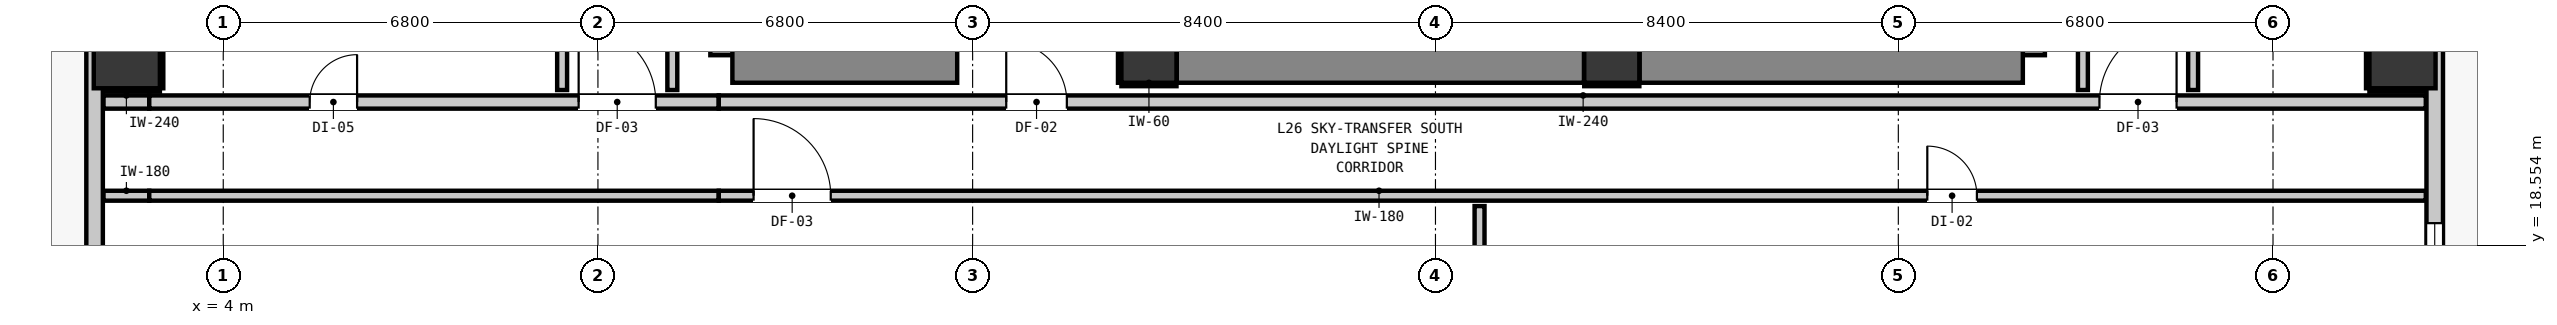
"""IFC4 building model, lengths in metres.
Left out: names, types, materials, properties, quantities, classifications, styles, units other than length and angle.
Written with IfcOpenShell. Run it as: python <this file> out.ifc"""

import sys

from ifc_helpers import new_model, si_unit, direction, frame, frame_2d, origin, origin_2d, place, context, subcontext, project, spatial, rectangle, extrude, element, fill, save


model = new_model("IFC4")
c1 = context("Model", 3, precision=1e-05, world=origin(), true_north=direction((0.0, 1.0)))
c2 = subcontext(c1, "Body", "Model", "MODEL_VIEW")
j1 = project(units=[si_unit("LENGTHUNIT", "METRE"), si_unit("PLANEANGLEUNIT", "RADIAN")], contexts=[c1])
p1 = place(None, origin())
s1 = spatial("IfcSite", under=j1, at=p1, CompositionType="ELEMENT")
p2 = place(p1, origin())
s2 = spatial("IfcBuilding", under=s1, at=p2, CompositionType="ELEMENT")
p3 = place(p2, frame((0.0, 0.0, 92.8)))
s3 = spatial("IfcBuildingStorey", under=s2, at=p3, CompositionType="ELEMENT", Elevation=92.8)
for number, where, z_axis, x_axis in (
    (1, (20.8, 22.0, 0.0), (0.0, 0.0, 1.0), (1.0, 0.0, 0.0)),
    (2, (29.2, 22.0, 0.0), (0.0, 0.0, 1.0), (1.0, 0.0, 0.0)),
):
    element("IfcColumn", number, at=place(p3, frame(where, z_axis=z_axis, x_axis=x_axis)), inside=s3, PredefinedType="COLUMN", context=c2, shape_type="SweptSolid", body=[
        extrude(rectangle(XDim=1.0, YDim=1.0, at=origin_2d()), origin(), (0.0, 0.0, 1.0), 3.32),
    ])
p4 = place(p3, frame((13.34, 22.0, 0.0), z_axis=(0.0, 0.0, 1.0), x_axis=(0.0, 1.0, 0.0)))
e3 = element("IfcWall", 3, at=p4, inside=s3, PredefinedType="SHEAR", context=c2, shape_type="SweptSolid", body=[
    extrude(rectangle(XDim=8.195, YDim=1.0, at=frame_2d((4.098, 0.0))), origin(), (0.0, 0.0, 1.0), 3.32),
])
p5 = place(p3, frame((13.24, 22.0, 0.0), z_axis=(0.0, 0.0, 1.0), x_axis=(1.0, 0.0, 0.0)))
e4 = element("IfcWall", 4, at=p5, inside=s3, PredefinedType="SHEAR", context=c2, shape_type="SweptSolid", body=[
    extrude(rectangle(XDim=4.08, YDim=1.0, at=frame_2d((2.04, 0.0))), origin(), (0.0, 0.0, 1.0), 3.32),
])
p6 = place(p3, frame((36.56, 22.0, 0.0), z_axis=(0.0, 0.0, 1.0), x_axis=(0.0, 1.0, 0.0)))
e5 = element("IfcWall", 5, at=p6, inside=s3, PredefinedType="SHEAR", context=c2, shape_type="SweptSolid", body=[
    extrude(rectangle(XDim=8.195, YDim=1.0, at=frame_2d((4.098, 0.0))), origin(), (0.0, 0.0, 1.0), 3.32),
])
p7 = place(p3, frame((29.705, 22.0, 0.0), z_axis=(0.0, 0.0, 1.0), x_axis=(1.0, 0.0, 0.0)))
e6 = element("IfcWall", 6, at=p7, inside=s3, PredefinedType="SHEAR", context=c2, shape_type="SweptSolid", body=[
    extrude(rectangle(XDim=6.955, YDim=1.0, at=frame_2d((3.478, 0.0))), origin(), (0.0, 0.0, 1.0), 3.32),
])
p8 = place(p3, frame((21.305, 22.0, 0.0), z_axis=(0.0, 0.0, 1.0), x_axis=(1.0, 0.0, 0.0)))
e7 = element("IfcWall", 7, at=p8, inside=s3, PredefinedType="SHEAR", context=c2, shape_type="SweptSolid", body=[
    extrude(rectangle(XDim=7.39, YDim=1.0, at=frame_2d((3.695, 0.0))), origin(), (0.0, 0.0, 1.0), 3.32),
])
for number, where, z_axis, x_axis in (
    (8, (2.25, 22.0, 0.0), (0.0, 0.0, 1.0), (1.0, 0.0, 0.0)),
    (9, (43.55, 22.0, 0.0), (0.0, 0.0, 1.0), (1.0, 0.0, 0.0)),
):
    element("IfcColumn", number, at=place(p3, frame(where, z_axis=z_axis, x_axis=x_axis)), inside=s3, PredefinedType="COLUMN", context=c2, shape_type="SweptSolid", body=[
        extrude(rectangle(XDim=1.2, YDim=1.2, at=origin_2d()), origin(), (0.0, 0.0, 1.0), 3.32),
    ])
p9 = place(p3, frame((1.665, 16.365, 0.0), z_axis=(0.0, 0.0, 1.0), x_axis=(0.0, 1.0, 0.0)))
e10 = element("IfcWall", 10, at=p9, inside=s3, PredefinedType="STANDARD", context=c2, shape_type="SweptSolid", body=[
    extrude(rectangle(XDim=34.67, YDim=0.3, at=frame_2d((17.335, 0.0))), origin(), (0.0, 0.0, 1.0), 3.06),
])
p10 = place(p9, frame((0.901, 0.0, 0.0)))
e11 = element("IfcOpeningElement", 11, at=p10, cuts=e10, PredefinedType="OPENING", context=c2, shape_type="SweptSolid", body=[
    extrude(rectangle(XDim=1.0, YDim=2.15, at=frame_2d((0.5, 1.075))), frame((0.0, 0.16, 0.0), z_axis=(0.0, -1.0, 0.0), x_axis=(1.0, 0.0, 0.0)), (0.0, 0.0, 1.0), 0.32),
])
p11 = place(p9, frame((32.314, 0.0, 0.85)))
e12 = element("IfcOpeningElement", 12, at=p11, cuts=e10, PredefinedType="OPENING", context=c2, shape_type="SweptSolid", body=[
    extrude(rectangle(XDim=2.1, YDim=1.9, at=frame_2d((1.05, 0.95))), frame((0.0, 0.16, 0.0), z_axis=(0.0, -1.0, 0.0), x_axis=(1.0, 0.0, 0.0)), (0.0, 0.0, 1.0), 0.32),
])
p12 = place(p3, frame((44.135, 51.035, 0.0), z_axis=(0.0, 0.0, 1.0), x_axis=(0.0, -1.0, 0.0)))
e13 = element("IfcWall", 13, at=p12, inside=s3, PredefinedType="STANDARD", context=c2, shape_type="SweptSolid", body=[
    extrude(rectangle(XDim=34.67, YDim=0.3, at=frame_2d((17.335, 0.0))), origin(), (0.0, 0.0, 1.0), 3.06),
])
p13 = place(p12, frame((0.901, 0.0, 0.0)))
e14 = element("IfcOpeningElement", 14, at=p13, cuts=e13, PredefinedType="OPENING", context=c2, shape_type="SweptSolid", body=[
    extrude(rectangle(XDim=1.0, YDim=2.15, at=frame_2d((0.5, 1.075))), frame((0.0, 0.16, 0.0), z_axis=(0.0, -1.0, 0.0), x_axis=(1.0, 0.0, 0.0)), (0.0, 0.0, 1.0), 0.32),
])
p14 = place(p12, frame((32.083, 0.0, 0.85)))
e15 = element("IfcOpeningElement", 15, at=p14, cuts=e13, PredefinedType="OPENING", context=c2, shape_type="SweptSolid", body=[
    extrude(rectangle(XDim=2.1, YDim=1.9, at=frame_2d((1.05, 0.95))), frame((0.0, 0.16, 0.0), z_axis=(0.0, -1.0, 0.0), x_axis=(1.0, 0.0, 0.0)), (0.0, 0.0, 1.0), 0.32),
])
p15 = place(p12, frame((21.76, 0.0, 0.85)))
e16 = element("IfcOpeningElement", 16, at=p15, cuts=e13, PredefinedType="OPENING", context=c2, shape_type="SweptSolid", body=[
    extrude(rectangle(XDim=2.1, YDim=1.9, at=frame_2d((1.05, 0.95))), frame((0.0, 0.16, 0.0), z_axis=(0.0, -1.0, 0.0), x_axis=(1.0, 0.0, 0.0)), (0.0, 0.0, 1.0), 0.32),
])
p16 = place(p3, frame((1.827, 21.15, 0.0), z_axis=(0.0, 0.0, 1.0), x_axis=(1.0, 0.0, 0.0)))
e17 = element("IfcWall", 17, at=p16, inside=s3, PredefinedType="PARTITIONING", context=c2, shape_type="SweptSolid", body=[
    extrude(rectangle(XDim=0.83, YDim=0.24, at=frame_2d((0.415, 0.0))), origin(), (0.0, 0.0, 1.0), 3.06),
])
p17 = place(p3, frame((2.657, 21.15, 0.0), z_axis=(0.0, 0.0, 1.0), x_axis=(1.0, 0.0, 0.0)))
e18 = element("IfcWall", 18, at=p17, inside=s3, PredefinedType="PARTITIONING", context=c2, shape_type="SweptSolid", body=[
    extrude(rectangle(XDim=10.336, YDim=0.24, at=frame_2d((5.168, 0.0))), origin(), (0.0, 0.0, 1.0), 2.445),
])
p18 = place(p17, frame((7.793, 0.0, 0.0)))
e19 = element("IfcOpeningElement", 19, at=p18, cuts=e18, PredefinedType="OPENING", context=c2, shape_type="SweptSolid", body=[
    extrude(rectangle(XDim=1.4, YDim=2.15, at=frame_2d((0.7, 1.075))), frame((0.0, 0.13, 0.0), z_axis=(0.0, -1.0, 0.0), x_axis=(1.0, 0.0, 0.0)), (0.0, 0.0, 1.0), 0.26),
])
p19 = place(p17, frame((2.912, 0.0, 0.0)))
e20 = element("IfcOpeningElement", 20, at=p19, cuts=e18, PredefinedType="OPENING", context=c2, shape_type="SweptSolid", body=[
    extrude(rectangle(XDim=0.86, YDim=2.02, at=frame_2d((0.43, 1.01))), frame((0.0, 0.13, 0.0), z_axis=(0.0, -1.0, 0.0), x_axis=(1.0, 0.0, 0.0)), (0.0, 0.0, 1.0), 0.26),
])
p20 = place(p3, frame((12.993, 21.15, 0.0), z_axis=(0.0, 0.0, 1.0), x_axis=(1.0, 0.0, 0.0)))
e21 = element("IfcWall", 21, at=p20, inside=s3, PredefinedType="PARTITIONING", context=c2, shape_type="SweptSolid", body=[
    extrude(rectangle(XDim=30.98, YDim=0.24, at=frame_2d((15.49, 0.0))), origin(), (0.0, 0.0, 1.0), 3.06),
])
p21 = place(p20, frame((5.217, 0.0, 0.0)))
e22 = element("IfcOpeningElement", 22, at=p21, cuts=e21, PredefinedType="OPENING", context=c2, shape_type="SweptSolid", body=[
    extrude(rectangle(XDim=1.1, YDim=2.15, at=frame_2d((0.55, 1.075))), frame((0.0, 0.13, 0.0), z_axis=(0.0, -1.0, 0.0), x_axis=(1.0, 0.0, 0.0)), (0.0, 0.0, 1.0), 0.26),
])
p22 = place(p20, frame((25.057, 0.0, 0.0)))
e23 = element("IfcOpeningElement", 23, at=p22, cuts=e21, PredefinedType="OPENING", context=c2, shape_type="SweptSolid", body=[
    extrude(rectangle(XDim=1.4, YDim=2.15, at=frame_2d((0.7, 1.075))), frame((0.0, 0.13, 0.0), z_axis=(0.0, -1.0, 0.0), x_axis=(1.0, 0.0, 0.0)), (0.0, 0.0, 1.0), 0.26),
])
p23 = place(p3, frame((1.827, 19.45, 0.0), z_axis=(0.0, 0.0, 1.0), x_axis=(1.0, 0.0, 0.0)))
e24 = element("IfcWall", 24, at=p23, inside=s3, PredefinedType="PARTITIONING", context=c2, shape_type="SweptSolid", body=[
    extrude(rectangle(XDim=0.83, YDim=0.18, at=frame_2d((0.415, 0.0))), origin(), (0.0, 0.0, 1.0), 3.06),
])
p24 = place(p3, frame((2.657, 19.45, 0.0), z_axis=(0.0, 0.0, 1.0), x_axis=(1.0, 0.0, 0.0)))
e25 = element("IfcWall", 25, at=p24, inside=s3, PredefinedType="PARTITIONING", context=c2, shape_type="SweptSolid", body=[
    extrude(rectangle(XDim=10.336, YDim=0.18, at=frame_2d((5.168, 0.0))), origin(), (0.0, 0.0, 1.0), 2.445),
])
p25 = place(p3, frame((12.993, 19.45, 0.0), z_axis=(0.0, 0.0, 1.0), x_axis=(1.0, 0.0, 0.0)))
e26 = element("IfcWall", 26, at=p25, inside=s3, PredefinedType="PARTITIONING", context=c2, shape_type="SweptSolid", body=[
    extrude(rectangle(XDim=30.98, YDim=0.18, at=frame_2d((15.49, 0.0))), origin(), (0.0, 0.0, 1.0), 3.06),
])
p26 = place(p25, frame((0.632, 0.0, 0.0)))
e27 = element("IfcOpeningElement", 27, at=p26, cuts=e26, PredefinedType="OPENING", context=c2, shape_type="SweptSolid", body=[
    extrude(rectangle(XDim=1.4, YDim=2.15, at=frame_2d((0.7, 1.075))), frame((0.0, 0.1, 0.0), z_axis=(0.0, -1.0, 0.0), x_axis=(1.0, 0.0, 0.0)), (0.0, 0.0, 1.0), 0.2),
])
p27 = place(p25, frame((21.933, 0.0, 0.0)))
e28 = element("IfcOpeningElement", 28, at=p27, cuts=e26, PredefinedType="OPENING", context=c2, shape_type="SweptSolid", body=[
    extrude(rectangle(XDim=0.9, YDim=2.1, at=frame_2d((0.45, 1.05))), frame((0.0, 0.1, 0.0), z_axis=(0.0, -1.0, 0.0), x_axis=(1.0, 0.0, 0.0)), (0.0, 0.0, 1.0), 0.2),
])
p28 = place(p3, frame((10.15, 21.368, 0.0), z_axis=(0.0, 0.0, 1.0), x_axis=(0.0, 1.0, 0.0)))
e29 = element("IfcWall", 29, at=p28, inside=s3, PredefinedType="PARTITIONING", context=c2, shape_type="SweptSolid", body=[
    extrude(rectangle(XDim=5.264, YDim=0.18, at=frame_2d((2.632, 0.0))), origin(), (0.0, 0.0, 1.0), 3.06),
])
p29 = place(p3, frame((12.15, 21.368, 0.0), z_axis=(0.0, 0.0, 1.0), x_axis=(0.0, 1.0, 0.0)))
e30 = element("IfcWall", 30, at=p29, inside=s3, PredefinedType="PARTITIONING", context=c2, shape_type="SweptSolid", body=[
    extrude(rectangle(XDim=18.694, YDim=0.18, at=frame_2d((9.347, 0.0))), origin(), (0.0, 0.0, 1.0), 3.06),
])
p30 = place(p3, frame((26.8, 14.027, 0.0), z_axis=(0.0, 0.0, 1.0), x_axis=(0.0, 1.0, 0.0)))
e31 = element("IfcWall", 31, at=p30, inside=s3, PredefinedType="PARTITIONING", context=c2, shape_type="SweptSolid", body=[
    extrude(rectangle(XDim=5.235, YDim=0.18, at=frame_2d((2.617, 0.0))), origin(), (0.0, 0.0, 1.0), 3.06),
])
p31 = place(p3, frame((37.75, 21.368, 0.0), z_axis=(0.0, 0.0, 1.0), x_axis=(0.0, 1.0, 0.0)))
e32 = element("IfcWall", 32, at=p31, inside=s3, PredefinedType="PARTITIONING", context=c2, shape_type="SweptSolid", body=[
    extrude(rectangle(XDim=18.694, YDim=0.18, at=frame_2d((9.347, 0.0))), origin(), (0.0, 0.0, 1.0), 3.06),
])
p32 = place(p3, frame((39.75, 21.368, 0.0), z_axis=(0.0, 0.0, 1.0), x_axis=(0.0, 1.0, 0.0)))
e33 = element("IfcWall", 33, at=p32, inside=s3, PredefinedType="PARTITIONING", context=c2, shape_type="SweptSolid", body=[
    extrude(rectangle(XDim=4.714, YDim=0.18, at=frame_2d((2.357, 0.0))), origin(), (0.0, 0.0, 1.0), 3.06),
])
for number, where, z_axis, x_axis in (
    (34, (20.3, 21.468, 0.0), (0.0, 0.0, 1.0), (1.0, 0.0, 0.0)),
    (35, (20.268, 21.5, 0.0), (0.0, 0.0, 1.0), (0.0, 1.0, 0.0)),
    (36, (28.7, 21.468, 0.0), (0.0, 0.0, 1.0), (1.0, 0.0, 0.0)),
):
    element("IfcWall", number, at=place(p3, frame(where, z_axis=z_axis, x_axis=x_axis)), inside=s3, PredefinedType="PARTITIONING", context=c2, shape_type="SweptSolid", body=[
        extrude(rectangle(XDim=1.0, YDim=0.06, at=frame_2d((0.5, 0.0))), origin(), (0.0, 0.0, 1.0), 1.45),
    ])
p33 = place(p3, frame((1.83, 21.368, 0.0), z_axis=(0.0, 0.0, 1.0), x_axis=(1.0, 0.0, 0.0)))
e37 = element("IfcWall", 37, at=p33, inside=s3, PredefinedType="PARTITIONING", context=c2, shape_type="SweptSolid", body=[
    extrude(rectangle(XDim=1.02, YDim=0.06, at=frame_2d((0.51, 0.0))), origin(), (0.0, 0.0, 1.0), 1.45),
])
p34 = place(p3, frame((2.882, 21.4, 0.0), z_axis=(0.0, 0.0, 1.0), x_axis=(0.0, 1.0, 0.0)))
e38 = element("IfcWall", 38, at=p34, inside=s3, PredefinedType="PARTITIONING", context=c2, shape_type="SweptSolid", body=[
    extrude(rectangle(XDim=1.2, YDim=0.06, at=frame_2d((0.6, 0.0))), origin(), (0.0, 0.0, 1.0), 1.45),
])
p35 = place(p3, frame((42.95, 21.368, 0.0), z_axis=(0.0, 0.0, 1.0), x_axis=(1.0, 0.0, 0.0)))
e39 = element("IfcWall", 39, at=p35, inside=s3, PredefinedType="PARTITIONING", context=c2, shape_type="SweptSolid", body=[
    extrude(rectangle(XDim=1.02, YDim=0.06, at=frame_2d((0.51, 0.0))), origin(), (0.0, 0.0, 1.0), 1.45),
])
p36 = place(p3, frame((42.918, 21.4, 0.0), z_axis=(0.0, 0.0, 1.0), x_axis=(0.0, 1.0, 0.0)))
e40 = element("IfcWall", 40, at=p36, inside=s3, PredefinedType="PARTITIONING", context=c2, shape_type="SweptSolid", body=[
    extrude(rectangle(XDim=1.2, YDim=0.06, at=frame_2d((0.6, 0.0))), origin(), (0.0, 0.0, 1.0), 1.45),
])
p37 = place(p14, origin())
e41 = element("IfcWindow", 41, at=p37, inside=s3, PartitioningType="SINGLE_PANEL", PredefinedType="WINDOW", context=c2, shape_type="SweptSolid", body=[
    extrude(rectangle(XDim=2.1, YDim=1.9, at=frame_2d((1.05, 0.95))), frame((0.0, 0.03, 0.0), z_axis=(0.0, -1.0, 0.0), x_axis=(1.0, 0.0, 0.0)), (0.0, 0.0, 1.0), 0.06),
])
fill(e15, e41)
p38 = place(p21, origin())
e42 = element("IfcDoor", 42, at=p38, inside=s3, OperationType="SINGLE_SWING_LEFT", PredefinedType="DOOR", context=c2, shape_type="SweptSolid", body=[
    extrude(rectangle(XDim=1.1, YDim=2.15, at=frame_2d((0.55, 1.075))), frame((0.0, 0.025, 0.0), z_axis=(0.0, -1.0, 0.0), x_axis=(1.0, 0.0, 0.0)), (0.0, 0.0, 1.0), 0.05),
])
fill(e22, e42)
p39 = place(p18, origin())
e43 = element("IfcDoor", 43, at=p39, inside=s3, OperationType="SINGLE_SWING_LEFT", PredefinedType="DOOR", context=c2, shape_type="SweptSolid", body=[
    extrude(rectangle(XDim=1.4, YDim=2.15, at=frame_2d((0.7, 1.075))), frame((0.0, 0.025, 0.0), z_axis=(0.0, -1.0, 0.0), x_axis=(1.0, 0.0, 0.0)), (0.0, 0.0, 1.0), 0.05),
])
fill(e19, e43)
p40 = place(p22, origin())
e44 = element("IfcDoor", 44, at=p40, inside=s3, OperationType="SINGLE_SWING_RIGHT", PredefinedType="DOOR", context=c2, shape_type="SweptSolid", body=[
    extrude(rectangle(XDim=1.4, YDim=2.15, at=frame_2d((0.7, 1.075))), frame((0.0, 0.025, 0.0), z_axis=(0.0, -1.0, 0.0), x_axis=(1.0, 0.0, 0.0)), (0.0, 0.0, 1.0), 0.05),
])
fill(e23, e44)
p41 = place(p26, origin())
e45 = element("IfcDoor", 45, at=p41, inside=s3, OperationType="SINGLE_SWING_LEFT", PredefinedType="DOOR", context=c2, shape_type="SweptSolid", body=[
    extrude(rectangle(XDim=1.4, YDim=2.15, at=frame_2d((0.7, 1.075))), frame((0.0, 0.025, 0.0), z_axis=(0.0, -1.0, 0.0), x_axis=(1.0, 0.0, 0.0)), (0.0, 0.0, 1.0), 0.05),
])
fill(e27, e45)
p42 = place(p27, origin())
e46 = element("IfcDoor", 46, at=p42, inside=s3, OperationType="SINGLE_SWING_LEFT", PredefinedType="DOOR", context=c2, shape_type="SweptSolid", body=[
    extrude(rectangle(XDim=0.9, YDim=2.1, at=frame_2d((0.45, 1.05))), frame((0.0, 0.025, 0.0), z_axis=(0.0, -1.0, 0.0), x_axis=(1.0, 0.0, 0.0)), (0.0, 0.0, 1.0), 0.05),
])
fill(e28, e46)
p43 = place(p19, origin())
e47 = element("IfcDoor", 47, at=p43, inside=s3, OperationType="SINGLE_SWING_RIGHT", PredefinedType="DOOR", context=c2, shape_type="SweptSolid", body=[
    extrude(rectangle(XDim=0.86, YDim=2.02, at=frame_2d((0.43, 1.01))), frame((0.0, 0.025, 0.0), z_axis=(0.0, -1.0, 0.0), x_axis=(1.0, 0.0, 0.0)), (0.0, 0.0, 1.0), 0.05),
])
fill(e20, e47)
save(model, sys.argv[1])
